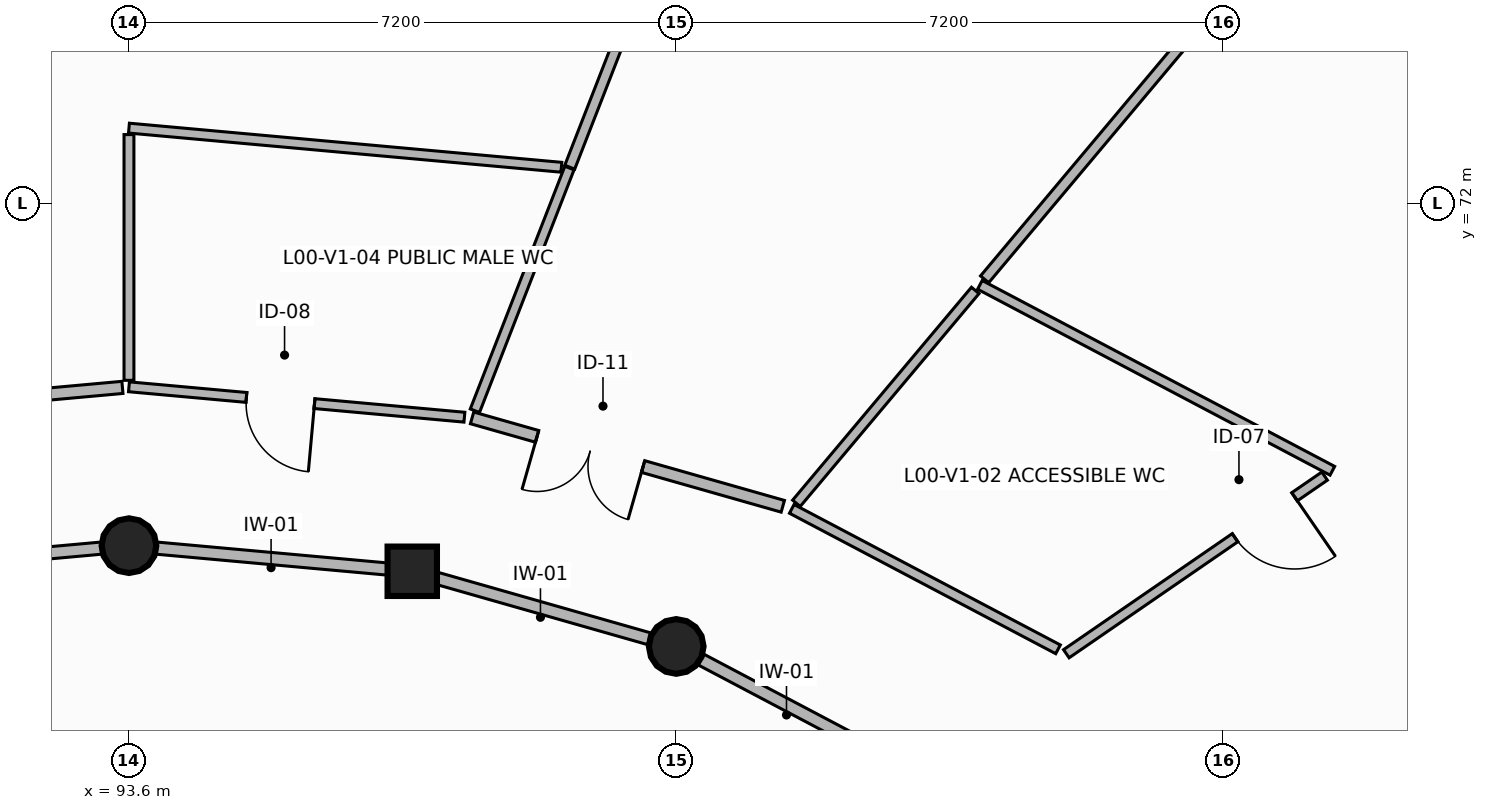
"""IFC4 building model, lengths in metres.
Left out: names, types, materials, properties, quantities, classifications, styles, units other than length and angle.
Written with IfcOpenShell. Run it as: python <this file> out.ifc"""

import sys

from ifc_helpers import new_model, si_unit, direction, frame, frame_2d, origin, origin_2d, place, context, subcontext, project, spatial, rectangle, circle, extrude, element, fill, save


model = new_model("IFC4")
c1 = context("Model", 3, precision=1e-05, world=origin(), true_north=direction((0.0, 1.0)))
c2 = subcontext(c1, "Body", "Model", "MODEL_VIEW")
j1 = project(units=[si_unit("LENGTHUNIT", "METRE"), si_unit("PLANEANGLEUNIT", "RADIAN")], contexts=[c1])
p1 = place(None, origin())
s1 = spatial("IfcSite", under=j1, at=p1, CompositionType="ELEMENT")
p2 = place(p1, origin())
s2 = spatial("IfcBuilding", under=s1, at=p2, CompositionType="ELEMENT")
p3 = place(p2, origin())
s3 = spatial("IfcBuildingStorey", under=s2, at=p3, CompositionType="ELEMENT", Elevation=0.0)
p4 = place(p3, frame((100.8, 66.174, -0.38), z_axis=(0.0, 0.0, 1.0), x_axis=(1.0, 0.0, 0.0)))
e1 = element("IfcColumn", 1, at=p4, inside=s3, PredefinedType="COLUMN", context=c2, shape_type="SweptSolid", body=[
    extrude(circle(Radius=0.36, at=origin_2d()), origin(), (0.0, 0.0, 1.0), 4.59),
])
p5 = place(p3, frame((97.327, 67.163, -0.38), z_axis=(0.0, 0.0, 1.0), x_axis=(1.0, 0.0, 0.0)))
e2 = element("IfcColumn", 2, at=p5, inside=s3, PredefinedType="COLUMN", context=c2, shape_type="SweptSolid", body=[
    extrude(rectangle(XDim=0.65, YDim=0.65, at=origin_2d()), origin(), (0.0, 0.0, 1.0), 4.59),
])
p6 = place(p3, frame((93.6, 67.5, -0.38), z_axis=(0.0, 0.0, 1.0), x_axis=(1.0, 0.0, 0.0)))
e3 = element("IfcColumn", 3, at=p6, inside=s3, PredefinedType="COLUMN", context=c2, shape_type="SweptSolid", body=[
    extrude(circle(Radius=0.36, at=origin_2d()), origin(), (0.0, 0.0, 1.0), 4.59),
])
p7 = place(p3, frame((103.486, 64.756, 0.0), z_axis=(0.0, 0.0, 1.0), x_axis=(-0.884419383508, 0.466692997672, 0.0)))
e4 = element("IfcWall", 4, at=p7, inside=s3, PredefinedType="PARTITIONING", context=c2, shape_type="SweptSolid", body=[
    extrude(rectangle(XDim=2.667, YDim=0.16, at=frame_2d((1.334, 0.0))), origin(), (0.0, 0.0, 1.0), 3.59),
])
p8 = place(p3, frame((100.444, 66.275, 0.0), z_axis=(0.0, 0.0, 1.0), x_axis=(-0.961748689224, 0.273933310818, 0.0)))
e5 = element("IfcWall", 5, at=p8, inside=s3, PredefinedType="PARTITIONING", context=c2, shape_type="SweptSolid", body=[
    extrude(rectangle(XDim=2.906, YDim=0.16, at=frame_2d((1.453, 0.0))), origin(), (0.0, 0.0, 1.0), 3.59),
])
p9 = place(p3, frame((96.993, 67.193, 0.0), z_axis=(0.0, 0.0, 1.0), x_axis=(-0.995924771152, 0.090187860632, 0.0)))
e6 = element("IfcWall", 6, at=p9, inside=s3, PredefinedType="PARTITIONING", context=c2, shape_type="SweptSolid", body=[
    extrude(rectangle(XDim=3.037, YDim=0.16, at=frame_2d((1.519, 0.0))), origin(), (0.0, 0.0, 1.0), 3.59),
])
p10 = place(p3, frame((93.232, 67.467, 0.0), z_axis=(0.0, 0.0, 1.0), x_axis=(-0.995924771152, -0.090187860632, 0.0)))
e7 = element("IfcWall", 7, at=p10, inside=s3, PredefinedType="PARTITIONING", context=c2, shape_type="SweptSolid", body=[
    extrude(rectangle(XDim=3.037, YDim=0.16, at=frame_2d((1.519, 0.0))), origin(), (0.0, 0.0, 1.0), 3.59),
])
p11 = place(p10, frame((0.794, 0.0, 0.0)))
e8 = element("IfcOpeningElement", 8, at=p11, cuts=e7, PredefinedType="OPENING", context=c2, shape_type="SweptSolid", body=[
    extrude(rectangle(XDim=1.45, YDim=2.25, at=frame_2d((0.725, 1.125))), frame((0.0, 0.09, 0.0), z_axis=(0.0, -1.0, 0.0), x_axis=(1.0, 0.0, 0.0)), (0.0, 0.0, 1.0), 0.18),
])
p12 = place(p3, frame((108.805, 63.635, 0.0), z_axis=(0.0, 0.0, 1.0), x_axis=(0.929435882849, 0.36898365773, 0.0)))
e9 = element("IfcWall", 9, at=p12, inside=s3, PredefinedType="PARTITIONING", context=c2, shape_type="SweptSolid", body=[
    extrude(rectangle(XDim=13.088, YDim=0.16, at=frame_2d((6.544, 0.0))), origin(), (0.0, 0.0, 1.0), 3.59),
])
p13 = place(p12, frame((4.574, 0.0, 0.0)))
e10 = element("IfcOpeningElement", 10, at=p13, cuts=e9, PredefinedType="OPENING", context=c2, shape_type="SweptSolid", body=[
    extrude(rectangle(XDim=1.05, YDim=2.15, at=frame_2d((0.525, 1.075))), frame((0.0, 0.09, 0.0), z_axis=(0.0, -1.0, 0.0), x_axis=(1.0, 0.0, 0.0)), (0.0, 0.0, 1.0), 0.18),
])
p14 = place(p3, frame((104.795, 70.931, 0.0), z_axis=(0.0, 0.0, 1.0), x_axis=(0.884501669722, -0.466537025603, 0.0)))
e11 = element("IfcWall", 11, at=p14, inside=s3, PredefinedType="PARTITIONING", context=c2, shape_type="SweptSolid", body=[
    extrude(rectangle(XDim=5.242, YDim=0.13, at=frame_2d((2.621, 0.0))), origin(), (0.0, 0.0, 1.0), 3.59),
])
p15 = place(p3, frame((109.33, 68.415, 0.0), z_axis=(0.0, 0.0, 1.0), x_axis=(-0.823940006946, -0.56667703761, 0.0)))
e12 = element("IfcWall", 12, at=p15, inside=s3, PredefinedType="PARTITIONING", context=c2, shape_type="SweptSolid", body=[
    extrude(rectangle(XDim=4.124, YDim=0.13, at=frame_2d((2.062, 0.0))), origin(), (0.0, 0.0, 1.0), 3.59),
])
p16 = place(p15, frame((0.48, 0.0, 0.0)))
e13 = element("IfcOpeningElement", 13, at=p16, cuts=e12, PredefinedType="OPENING", context=c2, shape_type="SweptSolid", body=[
    extrude(rectangle(XDim=0.95, YDim=2.1, at=frame_2d((0.475, 1.05))), frame((0.0, 0.075, 0.0), z_axis=(0.0, -1.0, 0.0), x_axis=(1.0, 0.0, 0.0)), (0.0, 0.0, 1.0), 0.15),
])
p17 = place(p3, frame((105.823, 66.136, 0.0), z_axis=(0.0, 0.0, 1.0), x_axis=(-0.884475212642, 0.466587181802, 0.0)))
e14 = element("IfcWall", 14, at=p17, inside=s3, PredefinedType="PARTITIONING", context=c2, shape_type="SweptSolid", body=[
    extrude(rectangle(XDim=3.96, YDim=0.13, at=frame_2d((1.98, 0.0))), origin(), (0.0, 0.0, 1.0), 3.59),
])
p18 = place(p3, frame((102.381, 68.057, 0.0), z_axis=(0.0, 0.0, 1.0), x_axis=(0.643179564641, 0.765715382912, 0.0)))
e15 = element("IfcWall", 15, at=p18, inside=s3, PredefinedType="PARTITIONING", context=c2, shape_type="SweptSolid", body=[
    extrude(rectangle(XDim=3.658, YDim=0.13, at=frame_2d((1.829, 0.0))), origin(), (0.0, 0.0, 1.0), 3.59),
])
p19 = place(p3, frame((109.362, 76.37, 0.0), z_axis=(0.0, 0.0, 1.0), x_axis=(-0.642983682644, -0.765879875603, 0.0)))
e16 = element("IfcWall", 16, at=p19, inside=s3, PredefinedType="PARTITIONING", context=c2, shape_type="SweptSolid", body=[
    extrude(rectangle(XDim=7.007, YDim=0.14, at=frame_2d((3.503, 0.0))), origin(), (0.0, 0.0, 1.0), 3.59),
])
p20 = place(p3, frame((102.202, 68.018, 0.0), z_axis=(0.0, 0.0, 1.0), x_axis=(-0.961841952324, 0.27360566286, 0.0)))
e17 = element("IfcWall", 17, at=p20, inside=s3, PredefinedType="PARTITIONING", context=c2, shape_type="SweptSolid", body=[
    extrude(rectangle(XDim=4.25, YDim=0.16, at=frame_2d((2.125, 0.0))), origin(), (0.0, 0.0, 1.0), 3.59),
])
p21 = place(p20, frame((1.911, 0.0, 0.0)))
e18 = element("IfcOpeningElement", 18, at=p21, cuts=e17, PredefinedType="OPENING", context=c2, shape_type="SweptSolid", body=[
    extrude(rectangle(XDim=1.45, YDim=2.25, at=frame_2d((0.725, 1.125))), frame((0.0, 0.09, 0.0), z_axis=(0.0, -1.0, 0.0), x_axis=(1.0, 0.0, 0.0)), (0.0, 0.0, 1.0), 0.18),
])
p22 = place(p3, frame((98.151, 69.275, 0.0), z_axis=(0.0, 0.0, 1.0), x_axis=(0.36304782486, 0.931770506543, 0.0)))
e19 = element("IfcWall", 19, at=p22, inside=s3, PredefinedType="PARTITIONING", context=c2, shape_type="SweptSolid", body=[
    extrude(rectangle(XDim=3.427, YDim=0.13, at=frame_2d((1.713, 0.0))), origin(), (0.0, 0.0, 1.0), 3.59),
])
p23 = place(p3, frame((99.399, 72.479, 0.0), z_axis=(0.0, 0.0, 1.0), x_axis=(0.363214868858, 0.93170540357, 0.0)))
e20 = element("IfcWall", 20, at=p23, inside=s3, PredefinedType="PARTITIONING", context=c2, shape_type="SweptSolid", body=[
    extrude(rectangle(XDim=6.468, YDim=0.14, at=frame_2d((3.234, 0.0))), origin(), (0.0, 0.0, 1.0), 3.59),
])
p24 = place(p3, frame((93.6, 72.993, 0.0), z_axis=(0.0, 0.0, 1.0), x_axis=(0.995929211202, -0.090138816686, 0.0)))
e21 = element("IfcWall", 21, at=p24, inside=s3, PredefinedType="PARTITIONING", context=c2, shape_type="SweptSolid", body=[
    extrude(rectangle(XDim=5.712, YDim=0.13, at=frame_2d((2.856, 0.0))), origin(), (0.0, 0.0, 1.0), 3.59),
])
p25 = place(p3, frame((98.013, 69.19, 0.0), z_axis=(0.0, 0.0, 1.0), x_axis=(-0.995913955271, 0.090307218406, 0.0)))
e22 = element("IfcWall", 22, at=p25, inside=s3, PredefinedType="PARTITIONING", context=c2, shape_type="SweptSolid", body=[
    extrude(rectangle(XDim=4.431, YDim=0.13, at=frame_2d((2.215, 0.0))), origin(), (0.0, 0.0, 1.0), 3.59),
])
p26 = place(p25, frame((1.98, 0.0, 0.0)))
e23 = element("IfcOpeningElement", 23, at=p26, cuts=e22, PredefinedType="OPENING", context=c2, shape_type="SweptSolid", body=[
    extrude(rectangle(XDim=0.9, YDim=2.1, at=frame_2d((0.45, 1.05))), frame((0.0, 0.075, 0.0), z_axis=(0.0, -1.0, 0.0), x_axis=(1.0, 0.0, 0.0)), (0.0, 0.0, 1.0), 0.15),
])
p27 = place(p3, frame((93.6, 69.675, 0.0), z_axis=(0.0, 0.0, 1.0), x_axis=(0.0, 1.0, 0.0)))
e24 = element("IfcWall", 24, at=p27, inside=s3, PredefinedType="PARTITIONING", context=c2, shape_type="SweptSolid", body=[
    extrude(rectangle(XDim=3.233, YDim=0.13, at=frame_2d((1.616, 0.0))), origin(), (0.0, 0.0, 1.0), 3.59),
])
p28 = place(p3, frame((93.514, 69.582, 0.0), z_axis=(0.0, 0.0, 1.0), x_axis=(-0.995921961863, -0.090218877617, 0.0)))
e25 = element("IfcWall", 25, at=p28, inside=s3, PredefinedType="PARTITIONING", context=c2, shape_type="SweptSolid", body=[
    extrude(rectangle(XDim=4.446, YDim=0.16, at=frame_2d((2.223, 0.0))), origin(), (0.0, 0.0, 1.0), 3.59),
])
p29 = place(p28, frame((1.354, 0.0, 0.0)))
e26 = element("IfcOpeningElement", 26, at=p29, cuts=e25, PredefinedType="OPENING", context=c2, shape_type="SweptSolid", body=[
    extrude(rectangle(XDim=1.3, YDim=2.25, at=frame_2d((0.65, 1.125))), frame((0.0, 0.09, 0.0), z_axis=(0.0, -1.0, 0.0), x_axis=(1.0, 0.0, 0.0)), (0.0, 0.0, 1.0), 0.18),
])
p30 = place(p16, origin())
e27 = element("IfcDoor", 27, at=p30, inside=s3, OperationType="SINGLE_SWING_LEFT", PredefinedType="DOOR", context=c2, shape_type="SweptSolid", body=[
    extrude(rectangle(XDim=0.95, YDim=2.1, at=frame_2d((0.475, 1.05))), frame((0.0, 0.025, 0.0), z_axis=(0.0, -1.0, 0.0), x_axis=(1.0, 0.0, 0.0)), (0.0, 0.0, 1.0), 0.05),
])
fill(e13, e27)
p31 = place(p21, origin())
e28 = element("IfcDoor", 28, at=p31, inside=s3, OperationType="DOUBLE_DOOR_SINGLE_SWING", PredefinedType="DOOR", context=c2, shape_type="SweptSolid", body=[
    extrude(rectangle(XDim=1.45, YDim=2.25, at=frame_2d((0.725, 1.125))), frame((0.0, 0.025, 0.0), z_axis=(0.0, -1.0, 0.0), x_axis=(1.0, 0.0, 0.0)), (0.0, 0.0, 1.0), 0.05),
])
fill(e18, e28)
p32 = place(p26, origin())
e29 = element("IfcDoor", 29, at=p32, inside=s3, OperationType="SINGLE_SWING_LEFT", PredefinedType="DOOR", context=c2, shape_type="SweptSolid", body=[
    extrude(rectangle(XDim=0.9, YDim=2.1, at=frame_2d((0.45, 1.05))), frame((0.0, 0.025, 0.0), z_axis=(0.0, -1.0, 0.0), x_axis=(1.0, 0.0, 0.0)), (0.0, 0.0, 1.0), 0.05),
])
fill(e23, e29)
save(model, sys.argv[1])
